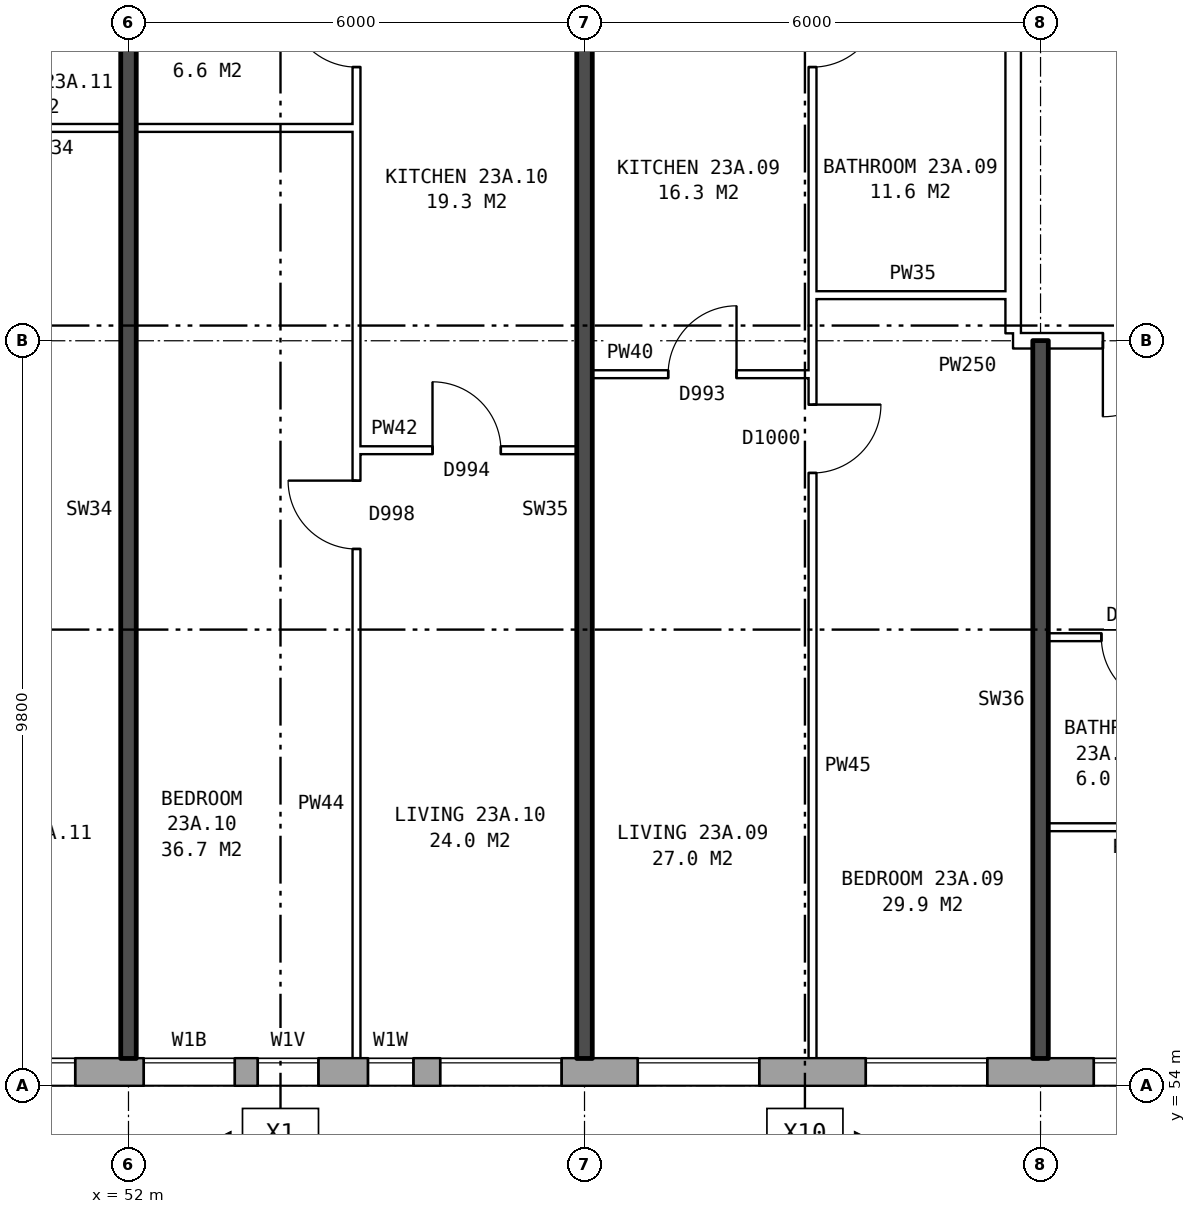
"""IFC4 building model, lengths in metres.
Left out: names, types, materials, properties, quantities, classifications, styles, units other than length and angle.
Written with IfcOpenShell. Run it as: python <this file> out.ifc"""

import sys

from ifc_helpers import new_model, si_unit, direction, frame, frame_2d, origin, place, context, subcontext, project, spatial, rectangle, extrude, element, fill, save


model = new_model("IFC4")
c1 = context("Model", 3, precision=1e-05, world=origin(), true_north=direction((0.0, 1.0)))
c2 = subcontext(c1, "Body", "Model", "MODEL_VIEW")
j1 = project(units=[si_unit("LENGTHUNIT", "METRE"), si_unit("PLANEANGLEUNIT", "RADIAN")], contexts=[c1])
p1 = place(None, origin())
s1 = spatial("IfcSite", under=j1, at=p1, CompositionType="ELEMENT")
p2 = place(p1, origin())
s2 = spatial("IfcBuilding", under=s1, at=p2, CompositionType="ELEMENT")
p3 = place(p2, frame((0.0, 0.0, 84.0)))
s3 = spatial("IfcBuildingStorey", under=s2, at=p3, CompositionType="ELEMENT", Elevation=84.0)
p4 = place(p3, frame((26.325, 54.18, 0.0), z_axis=(0.0, 0.0, 1.0), x_axis=(1.0, 0.0, 0.0)))
e1 = element("IfcWall", 1, at=p4, inside=s3, PredefinedType="STANDARD", context=c2, shape_type="SweptSolid", body=[
    extrude(rectangle(XDim=46.601, YDim=0.36, at=frame_2d((23.3, 0.0))), origin(), (0.0, 0.0, 1.0), 2.85),
])
p5 = place(p4, frame((2.375, 0.0, 0.8)))
e2 = element("IfcOpeningElement", 2, at=p5, cuts=e1, PredefinedType="OPENING", context=c2, shape_type="SweptSolid", body=[
    extrude(rectangle(XDim=1.6, YDim=1.8, at=frame_2d((0.8, 0.9))), frame((0.0, 0.19, 0.0), z_axis=(0.0, -1.0, 0.0), x_axis=(1.0, 0.0, 0.0)), (0.0, 0.0, 1.0), 0.38),
])
p6 = place(p4, frame((5.375, 0.0, 0.8)))
e3 = element("IfcOpeningElement", 3, at=p6, cuts=e1, PredefinedType="OPENING", context=c2, shape_type="SweptSolid", body=[
    extrude(rectangle(XDim=1.6, YDim=1.8, at=frame_2d((0.8, 0.9))), frame((0.0, 0.19, 0.0), z_axis=(0.0, -1.0, 0.0), x_axis=(1.0, 0.0, 0.0)), (0.0, 0.0, 1.0), 0.38),
])
p7 = place(p4, frame((8.375, 0.0, 0.8)))
e4 = element("IfcOpeningElement", 4, at=p7, cuts=e1, PredefinedType="OPENING", context=c2, shape_type="SweptSolid", body=[
    extrude(rectangle(XDim=1.6, YDim=1.8, at=frame_2d((0.8, 0.9))), frame((0.0, 0.19, 0.0), z_axis=(0.0, -1.0, 0.0), x_axis=(1.0, 0.0, 0.0)), (0.0, 0.0, 1.0), 0.38),
])
p8 = place(p4, frame((11.375, 0.0, 0.8)))
e5 = element("IfcOpeningElement", 5, at=p8, cuts=e1, PredefinedType="OPENING", context=c2, shape_type="SweptSolid", body=[
    extrude(rectangle(XDim=1.6, YDim=1.8, at=frame_2d((0.8, 0.9))), frame((0.0, 0.19, 0.0), z_axis=(0.0, -1.0, 0.0), x_axis=(1.0, 0.0, 0.0)), (0.0, 0.0, 1.0), 0.38),
])
p9 = place(p4, frame((14.375, 0.0, 0.8)))
e6 = element("IfcOpeningElement", 6, at=p9, cuts=e1, PredefinedType="OPENING", context=c2, shape_type="SweptSolid", body=[
    extrude(rectangle(XDim=1.6, YDim=1.8, at=frame_2d((0.8, 0.9))), frame((0.0, 0.19, 0.0), z_axis=(0.0, -1.0, 0.0), x_axis=(1.0, 0.0, 0.0)), (0.0, 0.0, 1.0), 0.38),
])
p10 = place(p4, frame((16.275, 0.0, 1.4)))
e7 = element("IfcOpeningElement", 7, at=p10, cuts=e1, PredefinedType="OPENING", context=c2, shape_type="SweptSolid", body=[
    extrude(rectangle(XDim=1.2, YDim=1.2, at=frame_2d((0.6, 0.6))), frame((0.0, 0.19, 0.0), z_axis=(0.0, -1.0, 0.0), x_axis=(1.0, 0.0, 0.0)), (0.0, 0.0, 1.0), 0.38),
])
p11 = place(p4, frame((20.375, 0.0, 0.8)))
e8 = element("IfcOpeningElement", 8, at=p11, cuts=e1, PredefinedType="OPENING", context=c2, shape_type="SweptSolid", body=[
    extrude(rectangle(XDim=1.6, YDim=1.8, at=frame_2d((0.8, 0.9))), frame((0.0, 0.19, 0.0), z_axis=(0.0, -1.0, 0.0), x_axis=(1.0, 0.0, 0.0)), (0.0, 0.0, 1.0), 0.38),
])
p12 = place(p4, frame((23.375, 0.0, 0.8)))
e9 = element("IfcOpeningElement", 9, at=p12, cuts=e1, PredefinedType="OPENING", context=c2, shape_type="SweptSolid", body=[
    extrude(rectangle(XDim=1.6, YDim=1.8, at=frame_2d((0.8, 0.9))), frame((0.0, 0.19, 0.0), z_axis=(0.0, -1.0, 0.0), x_axis=(1.0, 0.0, 0.0)), (0.0, 0.0, 1.0), 0.38),
])
p13 = place(p4, frame((25.875, 0.0, 0.15)))
e10 = element("IfcOpeningElement", 10, at=p13, cuts=e1, PredefinedType="OPENING", context=c2, shape_type="SweptSolid", body=[
    extrude(rectangle(XDim=1.2, YDim=1.8, at=frame_2d((0.6, 0.9))), frame((0.0, 0.19, 0.0), z_axis=(0.0, -1.0, 0.0), x_axis=(1.0, 0.0, 0.0)), (0.0, 0.0, 1.0), 0.38),
])
p14 = place(p4, frame((28.825, 0.0, 1.7)))
e11 = element("IfcOpeningElement", 11, at=p14, cuts=e1, PredefinedType="OPENING", context=c2, shape_type="SweptSolid", body=[
    extrude(rectangle(XDim=0.6, YDim=0.9, at=frame_2d((0.3, 0.45))), frame((0.0, 0.19, 0.0), z_axis=(0.0, -1.0, 0.0), x_axis=(1.0, 0.0, 0.0)), (0.0, 0.0, 1.0), 0.38),
])
p15 = place(p4, frame((32.375, 0.0, 0.8)))
e12 = element("IfcOpeningElement", 12, at=p15, cuts=e1, PredefinedType="OPENING", context=c2, shape_type="SweptSolid", body=[
    extrude(rectangle(XDim=1.6, YDim=1.8, at=frame_2d((0.8, 0.9))), frame((0.0, 0.19, 0.0), z_axis=(0.0, -1.0, 0.0), x_axis=(1.0, 0.0, 0.0)), (0.0, 0.0, 1.0), 0.38),
])
p16 = place(p4, frame((35.375, 0.0, 0.8)))
e13 = element("IfcOpeningElement", 13, at=p16, cuts=e1, PredefinedType="OPENING", context=c2, shape_type="SweptSolid", body=[
    extrude(rectangle(XDim=1.6, YDim=1.8, at=frame_2d((0.8, 0.9))), frame((0.0, 0.19, 0.0), z_axis=(0.0, -1.0, 0.0), x_axis=(1.0, 0.0, 0.0)), (0.0, 0.0, 1.0), 0.38),
])
p17 = place(p4, frame((38.375, 0.0, 0.8)))
e14 = element("IfcOpeningElement", 14, at=p17, cuts=e1, PredefinedType="OPENING", context=c2, shape_type="SweptSolid", body=[
    extrude(rectangle(XDim=1.6, YDim=1.8, at=frame_2d((0.8, 0.9))), frame((0.0, 0.19, 0.0), z_axis=(0.0, -1.0, 0.0), x_axis=(1.0, 0.0, 0.0)), (0.0, 0.0, 1.0), 0.38),
])
p18 = place(p4, frame((41.375, 0.0, 0.8)))
e15 = element("IfcOpeningElement", 15, at=p18, cuts=e1, PredefinedType="OPENING", context=c2, shape_type="SweptSolid", body=[
    extrude(rectangle(XDim=1.6, YDim=1.8, at=frame_2d((0.8, 0.9))), frame((0.0, 0.19, 0.0), z_axis=(0.0, -1.0, 0.0), x_axis=(1.0, 0.0, 0.0)), (0.0, 0.0, 1.0), 0.38),
])
p19 = place(p4, frame((44.375, 0.0, 0.8)))
e16 = element("IfcOpeningElement", 16, at=p19, cuts=e1, PredefinedType="OPENING", context=c2, shape_type="SweptSolid", body=[
    extrude(rectangle(XDim=1.6, YDim=1.8, at=frame_2d((0.8, 0.9))), frame((0.0, 0.19, 0.0), z_axis=(0.0, -1.0, 0.0), x_axis=(1.0, 0.0, 0.0)), (0.0, 0.0, 1.0), 0.38),
])
p20 = place(p4, frame((27.375, 0.0, 0.15)))
e17 = element("IfcOpeningElement", 17, at=p20, cuts=e1, PredefinedType="OPENING", context=c2, shape_type="SweptSolid", body=[
    extrude(rectangle(XDim=0.8, YDim=0.9, at=frame_2d((0.4, 0.45))), frame((0.0, 0.19, 0.0), z_axis=(0.0, -1.0, 0.0), x_axis=(1.0, 0.0, 0.0)), (0.0, 0.0, 1.0), 0.38),
])
p21 = place(p4, frame((29.775, 0.0, 0.8)))
e18 = element("IfcOpeningElement", 18, at=p21, cuts=e1, PredefinedType="OPENING", context=c2, shape_type="SweptSolid", body=[
    extrude(rectangle(XDim=1.6, YDim=1.8, at=frame_2d((0.8, 0.9))), frame((0.0, 0.19, 0.0), z_axis=(0.0, -1.0, 0.0), x_axis=(1.0, 0.0, 0.0)), (0.0, 0.0, 1.0), 0.38),
])
p22 = place(p3, frame((63.64, 63.9, 0.0), z_axis=(0.0, 0.0, 1.0), x_axis=(0.0, 1.0, 0.0)))
e19 = element("IfcWall", 19, at=p22, inside=s3, PredefinedType="PARTITIONING", context=c2, shape_type="SweptSolid", body=[
    extrude(rectangle(XDim=12.2, YDim=0.2, at=frame_2d((6.1, 0.0))), origin(), (0.0, 0.0, 1.0), 2.85),
])
p23 = place(p22, frame((5.1, 0.0, 0.0)))
e20 = element("IfcOpeningElement", 20, at=p23, cuts=e19, PredefinedType="OPENING", context=c2, shape_type="SweptSolid", body=[
    extrude(rectangle(XDim=2.0, YDim=2.1, at=frame_2d((1.0, 1.05))), frame((0.0, 0.11, 0.0), z_axis=(0.0, -1.0, 0.0), x_axis=(1.0, 0.0, 0.0)), (0.0, 0.0, 1.0), 0.22),
])
p24 = place(p3, frame((64.1, 57.4, 0.0), z_axis=(0.0, 0.0, 1.0), x_axis=(1.0, 0.0, 0.0)))
e21 = element("IfcWall", 21, at=p24, inside=s3, PredefinedType="PARTITIONING", context=c2, shape_type="SweptSolid", body=[
    extrude(rectangle(XDim=2.3, YDim=0.1, at=frame_2d((1.15, 0.0))), origin(), (0.0, 0.0, 1.0), 2.85),
])
p25 = place(p3, frame((64.1, 59.9, 0.0), z_axis=(0.0, 0.0, 1.0), x_axis=(1.0, 0.0, 0.0)))
e22 = element("IfcWall", 22, at=p25, inside=s3, PredefinedType="PARTITIONING", context=c2, shape_type="SweptSolid", body=[
    extrude(rectangle(XDim=5.8, YDim=0.1, at=frame_2d((2.9, 0.0))), origin(), (0.0, 0.0, 1.0), 2.85),
])
p26 = place(p25, frame((3.6, 0.0, 0.0)))
e23 = element("IfcOpeningElement", 23, at=p26, cuts=e22, PredefinedType="OPENING", context=c2, shape_type="SweptSolid", body=[
    extrude(rectangle(XDim=0.9, YDim=2.1, at=frame_2d((0.45, 1.05))), frame((0.0, 0.06, 0.0), z_axis=(0.0, -1.0, 0.0), x_axis=(1.0, 0.0, 0.0)), (0.0, 0.0, 1.0), 0.12),
])
p27 = place(p25, frame((0.7, 0.0, 0.0)))
e24 = element("IfcOpeningElement", 24, at=p27, cuts=e22, PredefinedType="OPENING", context=c2, shape_type="SweptSolid", body=[
    extrude(rectangle(XDim=0.9, YDim=2.1, at=frame_2d((0.45, 1.05))), frame((0.0, 0.06, 0.0), z_axis=(0.0, -1.0, 0.0), x_axis=(1.0, 0.0, 0.0)), (0.0, 0.0, 1.0), 0.12),
])
p28 = place(p3, frame((55.0, 62.36, 0.0), z_axis=(0.0, 0.0, 1.0), x_axis=(1.0, 0.0, 0.0)))
e25 = element("IfcWall", 25, at=p28, inside=s3, PredefinedType="PARTITIONING", context=c2, shape_type="SweptSolid", body=[
    extrude(rectangle(XDim=2.9, YDim=0.1, at=frame_2d((1.45, 0.0))), origin(), (0.0, 0.0, 1.0), 2.85),
])
p29 = place(p28, frame((1.0, 0.0, 0.0)))
e26 = element("IfcOpeningElement", 26, at=p29, cuts=e25, PredefinedType="OPENING", context=c2, shape_type="SweptSolid", body=[
    extrude(rectangle(XDim=0.9, YDim=2.1, at=frame_2d((0.45, 1.05))), frame((0.0, 0.06, 0.0), z_axis=(0.0, -1.0, 0.0), x_axis=(1.0, 0.0, 0.0)), (0.0, 0.0, 1.0), 0.12),
])
p30 = place(p3, frame((58.1, 63.36, 0.0), z_axis=(0.0, 0.0, 1.0), x_axis=(1.0, 0.0, 0.0)))
e27 = element("IfcWall", 27, at=p30, inside=s3, PredefinedType="PARTITIONING", context=c2, shape_type="SweptSolid", body=[
    extrude(rectangle(XDim=2.9, YDim=0.1, at=frame_2d((1.45, 0.0))), origin(), (0.0, 0.0, 1.0), 2.85),
])
p31 = place(p30, frame((1.0, 0.0, 0.0)))
e28 = element("IfcOpeningElement", 28, at=p31, cuts=e27, PredefinedType="OPENING", context=c2, shape_type="SweptSolid", body=[
    extrude(rectangle(XDim=0.9, YDim=2.1, at=frame_2d((0.45, 1.05))), frame((0.0, 0.06, 0.0), z_axis=(0.0, -1.0, 0.0), x_axis=(1.0, 0.0, 0.0)), (0.0, 0.0, 1.0), 0.12),
])
p32 = place(p3, frame((63.64, 63.8, 0.0), z_axis=(0.0, 0.0, 1.0), x_axis=(1.0, 0.0, 0.0)))
e29 = element("IfcWall", 29, at=p32, inside=s3, PredefinedType="PARTITIONING", context=c2, shape_type="SweptSolid", body=[
    extrude(rectangle(XDim=3.0, YDim=0.2, at=frame_2d((1.5, 0.0))), origin(), (0.0, 0.0, 1.0), 2.85),
])
p33 = place(p32, frame((1.18, 0.0, 0.0)))
e30 = element("IfcOpeningElement", 30, at=p33, cuts=e29, PredefinedType="OPENING", context=c2, shape_type="SweptSolid", body=[
    extrude(rectangle(XDim=1.0, YDim=2.1, at=frame_2d((0.5, 1.05))), frame((0.0, 0.11, 0.0), z_axis=(0.0, -1.0, 0.0), x_axis=(1.0, 0.0, 0.0)), (0.0, 0.0, 1.0), 0.22),
])
p34 = place(p3, frame((61.0, 64.4, 0.0), z_axis=(0.0, 0.0, 1.0), x_axis=(1.0, 0.0, 0.0)))
e31 = element("IfcWall", 31, at=p34, inside=s3, PredefinedType="PARTITIONING", context=c2, shape_type="SweptSolid", body=[
    extrude(rectangle(XDim=2.64, YDim=0.1, at=frame_2d((1.32, 0.0))), origin(), (0.0, 0.0, 1.0), 2.85),
])
p35 = place(p3, frame((49.0, 66.6, 0.0), z_axis=(0.0, 0.0, 1.0), x_axis=(1.0, 0.0, 0.0)))
e32 = element("IfcWall", 32, at=p35, inside=s3, PredefinedType="PARTITIONING", context=c2, shape_type="SweptSolid", body=[
    extrude(rectangle(XDim=6.0, YDim=0.1, at=frame_2d((3.0, 0.0))), origin(), (0.0, 0.0, 1.0), 2.85),
])
p36 = place(p3, frame((52.0, 54.36, 0.0), z_axis=(0.0, 0.0, 1.0), x_axis=(0.0, 1.0, 0.0)))
e33 = element("IfcWall", 33, at=p36, inside=s3, PredefinedType="SOLIDWALL", context=c2, shape_type="SweptSolid", body=[
    extrude(rectangle(XDim=14.44, YDim=0.2, at=frame_2d((7.22, 0.0))), origin(), (0.0, 0.0, 1.0), 2.85),
])
p37 = place(p3, frame((55.0, 54.36, 0.0), z_axis=(0.0, 0.0, 1.0), x_axis=(0.0, 1.0, 0.0)))
e34 = element("IfcWall", 34, at=p37, inside=s3, PredefinedType="PARTITIONING", context=c2, shape_type="SweptSolid", body=[
    extrude(rectangle(XDim=14.34, YDim=0.1, at=frame_2d((7.17, 0.0))), origin(), (0.0, 0.0, 1.0), 2.85),
])
p38 = place(p37, frame((6.7, 0.0, 0.0)))
e35 = element("IfcOpeningElement", 35, at=p38, cuts=e34, PredefinedType="OPENING", context=c2, shape_type="SweptSolid", body=[
    extrude(rectangle(XDim=0.9, YDim=2.1, at=frame_2d((0.45, 1.05))), frame((0.0, 0.06, 0.0), z_axis=(0.0, -1.0, 0.0), x_axis=(1.0, 0.0, 0.0)), (0.0, 0.0, 1.0), 0.12),
])
p39 = place(p37, frame((13.04, 0.0, 0.0)))
e36 = element("IfcOpeningElement", 36, at=p39, cuts=e34, PredefinedType="OPENING", context=c2, shape_type="SweptSolid", body=[
    extrude(rectangle(XDim=0.9, YDim=2.1, at=frame_2d((0.45, 1.05))), frame((0.0, 0.06, 0.0), z_axis=(0.0, -1.0, 0.0), x_axis=(1.0, 0.0, 0.0)), (0.0, 0.0, 1.0), 0.12),
])
p40 = place(p3, frame((58.0, 54.36, 0.0), z_axis=(0.0, 0.0, 1.0), x_axis=(0.0, 1.0, 0.0)))
e37 = element("IfcWall", 37, at=p40, inside=s3, PredefinedType="SOLIDWALL", context=c2, shape_type="SweptSolid", body=[
    extrude(rectangle(XDim=14.44, YDim=0.2, at=frame_2d((7.22, 0.0))), origin(), (0.0, 0.0, 1.0), 2.85),
])
p41 = place(p3, frame((61.0, 54.36, 0.0), z_axis=(0.0, 0.0, 1.0), x_axis=(0.0, 1.0, 0.0)))
e38 = element("IfcWall", 38, at=p41, inside=s3, PredefinedType="PARTITIONING", context=c2, shape_type="SweptSolid", body=[
    extrude(rectangle(XDim=14.34, YDim=0.1, at=frame_2d((7.17, 0.0))), origin(), (0.0, 0.0, 1.0), 2.85),
])
p42 = place(p41, frame((7.7, 0.0, 0.0)))
e39 = element("IfcOpeningElement", 39, at=p42, cuts=e38, PredefinedType="OPENING", context=c2, shape_type="SweptSolid", body=[
    extrude(rectangle(XDim=0.9, YDim=2.1, at=frame_2d((0.45, 1.05))), frame((0.0, 0.06, 0.0), z_axis=(0.0, -1.0, 0.0), x_axis=(1.0, 0.0, 0.0)), (0.0, 0.0, 1.0), 0.12),
])
p43 = place(p41, frame((13.04, 0.0, 0.0)))
e40 = element("IfcOpeningElement", 40, at=p43, cuts=e38, PredefinedType="OPENING", context=c2, shape_type="SweptSolid", body=[
    extrude(rectangle(XDim=0.9, YDim=2.1, at=frame_2d((0.45, 1.05))), frame((0.0, 0.06, 0.0), z_axis=(0.0, -1.0, 0.0), x_axis=(1.0, 0.0, 0.0)), (0.0, 0.0, 1.0), 0.12),
])
p44 = place(p3, frame((64.0, 54.36, 0.0), z_axis=(0.0, 0.0, 1.0), x_axis=(0.0, 1.0, 0.0)))
e41 = element("IfcWall", 41, at=p44, inside=s3, PredefinedType="SOLIDWALL", context=c2, shape_type="SweptSolid", body=[
    extrude(rectangle(XDim=9.44, YDim=0.2, at=frame_2d((4.72, 0.0))), origin(), (0.0, 0.0, 1.0), 2.85),
])
p45 = place(p12, origin())
e42 = element("IfcWindow", 42, at=p45, inside=s3, PartitioningType="SINGLE_PANEL", PredefinedType="WINDOW", context=c2, shape_type="SweptSolid", body=[
    extrude(rectangle(XDim=1.6, YDim=1.8, at=frame_2d((0.8, 0.9))), frame((0.0, 0.15, 0.0), z_axis=(0.0, -1.0, 0.0), x_axis=(1.0, 0.0, 0.0)), (0.0, 0.0, 1.0), 0.06),
])
fill(e9, e42)
p46 = place(p13, origin())
e43 = element("IfcWindow", 43, at=p46, inside=s3, PartitioningType="SINGLE_PANEL", PredefinedType="WINDOW", context=c2, shape_type="SweptSolid", body=[
    extrude(rectangle(XDim=1.2, YDim=1.8, at=frame_2d((0.6, 0.9))), frame((0.0, 0.15, 0.0), z_axis=(0.0, -1.0, 0.0), x_axis=(1.0, 0.0, 0.0)), (0.0, 0.0, 1.0), 0.06),
])
fill(e10, e43)
p47 = place(p14, origin())
e44 = element("IfcWindow", 44, at=p47, inside=s3, PartitioningType="SINGLE_PANEL", PredefinedType="WINDOW", context=c2, shape_type="SweptSolid", body=[
    extrude(rectangle(XDim=0.6, YDim=0.9, at=frame_2d((0.3, 0.45))), frame((0.0, 0.15, 0.0), z_axis=(0.0, -1.0, 0.0), x_axis=(1.0, 0.0, 0.0)), (0.0, 0.0, 1.0), 0.06),
])
fill(e11, e44)
p48 = place(p15, origin())
e45 = element("IfcWindow", 45, at=p48, inside=s3, PartitioningType="SINGLE_PANEL", PredefinedType="WINDOW", context=c2, shape_type="SweptSolid", body=[
    extrude(rectangle(XDim=1.6, YDim=1.8, at=frame_2d((0.8, 0.9))), frame((0.0, 0.15, 0.0), z_axis=(0.0, -1.0, 0.0), x_axis=(1.0, 0.0, 0.0)), (0.0, 0.0, 1.0), 0.06),
])
fill(e12, e45)
p49 = place(p16, origin())
e46 = element("IfcWindow", 46, at=p49, inside=s3, PartitioningType="SINGLE_PANEL", PredefinedType="WINDOW", context=c2, shape_type="SweptSolid", body=[
    extrude(rectangle(XDim=1.6, YDim=1.8, at=frame_2d((0.8, 0.9))), frame((0.0, 0.15, 0.0), z_axis=(0.0, -1.0, 0.0), x_axis=(1.0, 0.0, 0.0)), (0.0, 0.0, 1.0), 0.06),
])
fill(e13, e46)
p50 = place(p17, origin())
e47 = element("IfcWindow", 47, at=p50, inside=s3, PartitioningType="SINGLE_PANEL", PredefinedType="WINDOW", context=c2, shape_type="SweptSolid", body=[
    extrude(rectangle(XDim=1.6, YDim=1.8, at=frame_2d((0.8, 0.9))), frame((0.0, 0.15, 0.0), z_axis=(0.0, -1.0, 0.0), x_axis=(1.0, 0.0, 0.0)), (0.0, 0.0, 1.0), 0.06),
])
fill(e14, e47)
p51 = place(p33, frame((1.0, 0.0, 0.0), z_axis=(0.0, 0.0, 1.0), x_axis=(-1.0, 0.0, 0.0)))
e48 = element("IfcDoor", 48, at=p51, inside=s3, OperationType="SINGLE_SWING_RIGHT", PredefinedType="DOOR", context=c2, shape_type="SweptSolid", body=[
    extrude(rectangle(XDim=1.0, YDim=2.1, at=frame_2d((0.5, 1.05))), frame((0.0, 0.025, 0.0), z_axis=(0.0, -1.0, 0.0), x_axis=(1.0, 0.0, 0.0)), (0.0, 0.0, 1.0), 0.05),
])
fill(e30, e48)
p52 = place(p27, frame((0.9, 0.0, 0.0), z_axis=(0.0, 0.0, 1.0), x_axis=(-1.0, 0.0, 0.0)))
e49 = element("IfcDoor", 49, at=p52, inside=s3, OperationType="SINGLE_SWING_LEFT", PredefinedType="DOOR", context=c2, shape_type="SweptSolid", body=[
    extrude(rectangle(XDim=0.9, YDim=2.1, at=frame_2d((0.45, 1.05))), frame((0.0, 0.025, 0.0), z_axis=(0.0, -1.0, 0.0), x_axis=(1.0, 0.0, 0.0)), (0.0, 0.0, 1.0), 0.05),
])
fill(e24, e49)
p53 = place(p42, frame((0.9, 0.0, 0.0), z_axis=(0.0, 0.0, 1.0), x_axis=(-1.0, 0.0, 0.0)))
e50 = element("IfcDoor", 50, at=p53, inside=s3, OperationType="SINGLE_SWING_LEFT", PredefinedType="DOOR", context=c2, shape_type="SweptSolid", body=[
    extrude(rectangle(XDim=0.9, YDim=2.1, at=frame_2d((0.45, 1.05))), frame((0.0, 0.025, 0.0), z_axis=(0.0, -1.0, 0.0), x_axis=(1.0, 0.0, 0.0)), (0.0, 0.0, 1.0), 0.05),
])
fill(e39, e50)
p54 = place(p31, origin())
e51 = element("IfcDoor", 51, at=p54, inside=s3, OperationType="SINGLE_SWING_RIGHT", PredefinedType="DOOR", context=c2, shape_type="SweptSolid", body=[
    extrude(rectangle(XDim=0.9, YDim=2.1, at=frame_2d((0.45, 1.05))), frame((0.0, 0.025, 0.0), z_axis=(0.0, -1.0, 0.0), x_axis=(1.0, 0.0, 0.0)), (0.0, 0.0, 1.0), 0.05),
])
fill(e28, e51)
p55 = place(p43, frame((0.9, 0.0, 0.0), z_axis=(0.0, 0.0, 1.0), x_axis=(-1.0, 0.0, 0.0)))
e52 = element("IfcDoor", 52, at=p55, inside=s3, OperationType="SINGLE_SWING_LEFT", PredefinedType="DOOR", context=c2, shape_type="SweptSolid", body=[
    extrude(rectangle(XDim=0.9, YDim=2.1, at=frame_2d((0.45, 1.05))), frame((0.0, 0.025, 0.0), z_axis=(0.0, -1.0, 0.0), x_axis=(1.0, 0.0, 0.0)), (0.0, 0.0, 1.0), 0.05),
])
fill(e40, e52)
p56 = place(p38, origin())
e53 = element("IfcDoor", 53, at=p56, inside=s3, OperationType="SINGLE_SWING_RIGHT", PredefinedType="DOOR", context=c2, shape_type="SweptSolid", body=[
    extrude(rectangle(XDim=0.9, YDim=2.1, at=frame_2d((0.45, 1.05))), frame((0.0, 0.025, 0.0), z_axis=(0.0, -1.0, 0.0), x_axis=(1.0, 0.0, 0.0)), (0.0, 0.0, 1.0), 0.05),
])
fill(e35, e53)
p57 = place(p29, origin())
e54 = element("IfcDoor", 54, at=p57, inside=s3, OperationType="SINGLE_SWING_LEFT", PredefinedType="DOOR", context=c2, shape_type="SweptSolid", body=[
    extrude(rectangle(XDim=0.9, YDim=2.1, at=frame_2d((0.45, 1.05))), frame((0.0, 0.025, 0.0), z_axis=(0.0, -1.0, 0.0), x_axis=(1.0, 0.0, 0.0)), (0.0, 0.0, 1.0), 0.05),
])
fill(e26, e54)
p58 = place(p39, origin())
e55 = element("IfcDoor", 55, at=p58, inside=s3, OperationType="SINGLE_SWING_RIGHT", PredefinedType="DOOR", context=c2, shape_type="SweptSolid", body=[
    extrude(rectangle(XDim=0.9, YDim=2.1, at=frame_2d((0.45, 1.05))), frame((0.0, 0.025, 0.0), z_axis=(0.0, -1.0, 0.0), x_axis=(1.0, 0.0, 0.0)), (0.0, 0.0, 1.0), 0.05),
])
fill(e36, e55)
p59 = place(p20, origin())
e56 = element("IfcWindow", 56, at=p59, inside=s3, PartitioningType="SINGLE_PANEL", PredefinedType="WINDOW", context=c2, shape_type="SweptSolid", body=[
    extrude(rectangle(XDim=0.8, YDim=0.9, at=frame_2d((0.4, 0.45))), frame((0.0, 0.15, 0.0), z_axis=(0.0, -1.0, 0.0), x_axis=(1.0, 0.0, 0.0)), (0.0, 0.0, 1.0), 0.06),
])
fill(e17, e56)
p60 = place(p21, origin())
e57 = element("IfcWindow", 57, at=p60, inside=s3, PartitioningType="SINGLE_PANEL", PredefinedType="WINDOW", context=c2, shape_type="SweptSolid", body=[
    extrude(rectangle(XDim=1.6, YDim=1.8, at=frame_2d((0.8, 0.9))), frame((0.0, 0.15, 0.0), z_axis=(0.0, -1.0, 0.0), x_axis=(1.0, 0.0, 0.0)), (0.0, 0.0, 1.0), 0.06),
])
fill(e18, e57)
save(model, sys.argv[1])
